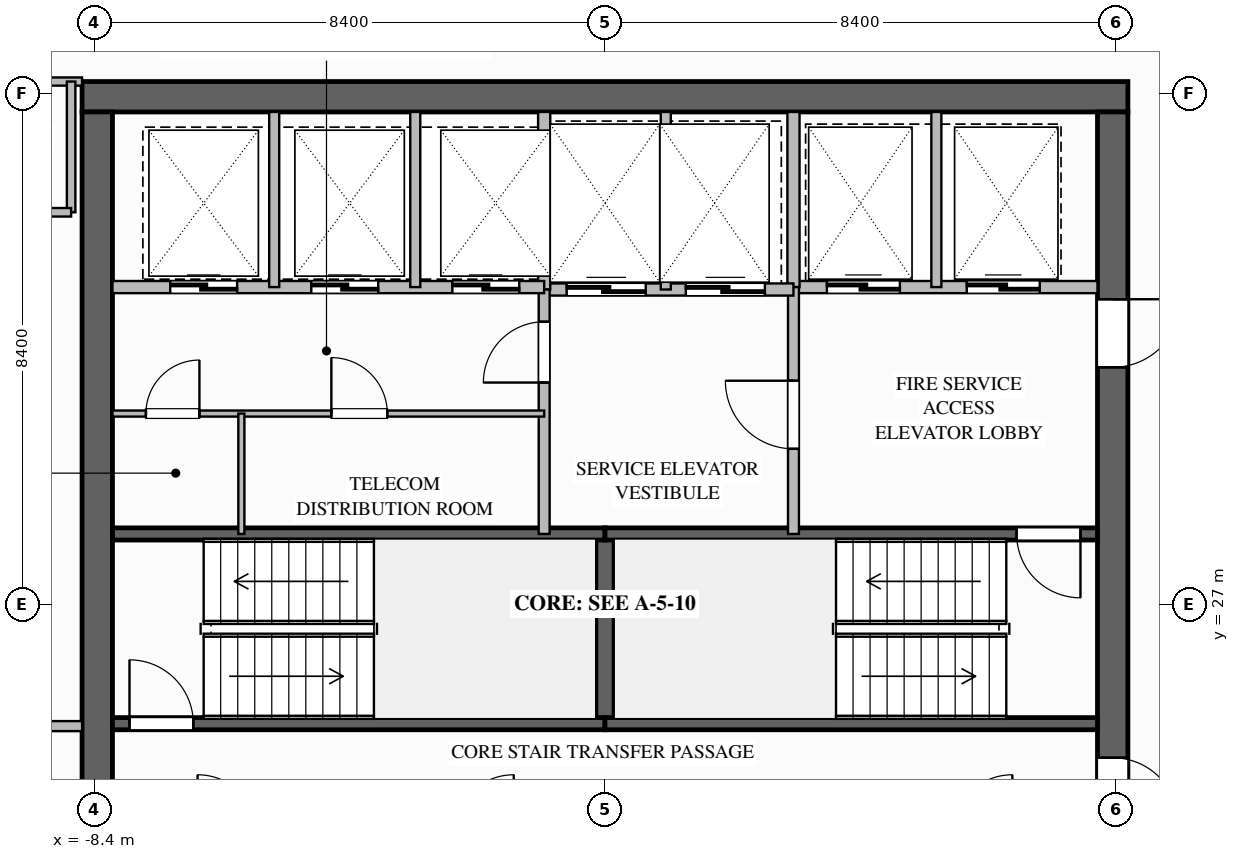
"""IFC4 building model, lengths in metres.
Left out: names, types, materials, properties, quantities, classifications, styles, units other than length and angle.
Written with IfcOpenShell. Run it as: python <this file> out.ifc"""

import sys

from ifc_helpers import new_model, si_unit, direction, frame, frame_2d, origin, place, context, subcontext, project, spatial, rectangle, extrude, element, fill, save


model = new_model("IFC4")
c1 = context("Model", 3, precision=1e-05, world=origin(), true_north=direction((0.0, 1.0)))
c2 = subcontext(c1, "Body", "Model", "MODEL_VIEW")
j1 = project(units=[si_unit("LENGTHUNIT", "METRE"), si_unit("PLANEANGLEUNIT", "RADIAN")], contexts=[c1])
p1 = place(None, origin())
s1 = spatial("IfcSite", under=j1, at=p1, CompositionType="ELEMENT")
p2 = place(p1, origin())
s2 = spatial("IfcBuilding", under=s1, at=p2, CompositionType="ELEMENT")
p3 = place(p2, frame((0.0, 0.0, 215.9)))
s3 = spatial("IfcBuildingStorey", under=s2, at=p3, CompositionType="ELEMENT", Elevation=215.9)
p4 = place(p3, frame((-8.6, 35.35, 0.0), z_axis=(0.0, 0.0, 1.0), x_axis=(1.0, 0.0, 0.0)))
e1 = element("IfcWall", 1, at=p4, inside=s3, PredefinedType="SHEAR", context=c2, shape_type="SweptSolid", body=[
    extrude(rectangle(XDim=17.2, YDim=0.5, at=frame_2d((8.6, 0.0))), origin(), (0.0, 0.0, 1.0), 3.6),
])
p5 = place(p3, frame((8.35, 35.1, 0.0), z_axis=(0.0, 0.0, 1.0), x_axis=(0.0, -1.0, 0.0)))
e2 = element("IfcWall", 2, at=p5, inside=s3, PredefinedType="SHEAR", context=c2, shape_type="SweptSolid", body=[
    extrude(rectangle(XDim=16.2, YDim=0.5, at=frame_2d((8.1, 0.0))), origin(), (0.0, 0.0, 1.0), 3.6),
])
p6 = place(p5, frame((3.08, 0.0, 0.0)))
e3 = element("IfcOpeningElement", 3, at=p6, cuts=e2, PredefinedType="OPENING", context=c2, shape_type="SweptSolid", body=[
    extrude(rectangle(XDim=1.12, YDim=2.1, at=frame_2d((0.56, 1.05))), frame((0.0, 0.26, 0.0), z_axis=(0.0, -1.0, 0.0), x_axis=(1.0, 0.0, 0.0)), (0.0, 0.0, 1.0), 0.52),
])
p7 = place(p5, frame((10.62, 0.0, 0.0)))
e4 = element("IfcOpeningElement", 4, at=p7, cuts=e2, PredefinedType="OPENING", context=c2, shape_type="SweptSolid", body=[
    extrude(rectangle(XDim=1.08, YDim=2.04, at=frame_2d((0.54, 1.02))), frame((0.0, 0.26, 0.0), z_axis=(0.0, -1.0, 0.0), x_axis=(1.0, 0.0, 0.0)), (0.0, 0.0, 1.0), 0.52),
])
p8 = place(p3, frame((-8.35, 18.9, 0.0), z_axis=(0.0, 0.0, 1.0), x_axis=(0.0, 1.0, 0.0)))
e5 = element("IfcWall", 5, at=p8, inside=s3, PredefinedType="SHEAR", context=c2, shape_type="SweptSolid", body=[
    extrude(rectangle(XDim=16.2, YDim=0.5, at=frame_2d((8.1, 0.0))), origin(), (0.0, 0.0, 1.0), 3.6),
])
p9 = place(p3, frame((0.0, 25.04, 0.0), z_axis=(0.0, 0.0, 1.0), x_axis=(0.0, 1.0, 0.0)))
e6 = element("IfcWall", 6, at=p9, inside=s3, PredefinedType="SOLIDWALL", context=c2, shape_type="SweptSolid", body=[
    extrude(rectangle(XDim=3.12, YDim=0.3, at=frame_2d((1.56, 0.0))), origin(), (0.0, 0.0, 1.0), 3.34),
])
p10 = place(p3, frame((-8.1, 25.04, 0.0), z_axis=(0.0, 0.0, 1.0), x_axis=(1.0, 0.0, 0.0)))
e7 = element("IfcWall", 7, at=p10, inside=s3, PredefinedType="SOLIDWALL", context=c2, shape_type="SweptSolid", body=[
    extrude(rectangle(XDim=8.1, YDim=0.2, at=frame_2d((4.05, 0.0))), origin(), (0.0, 0.0, 1.0), 3.34),
])
p11 = place(p10, frame((0.28, 0.0, 0.0)))
e8 = element("IfcOpeningElement", 8, at=p11, cuts=e7, PredefinedType="OPENING", context=c2, shape_type="SweptSolid", body=[
    extrude(rectangle(XDim=1.05, YDim=2.1, at=frame_2d((0.525, 1.05))), frame((0.0, 0.11, 0.0), z_axis=(0.0, -1.0, 0.0), x_axis=(1.0, 0.0, 0.0)), (0.0, 0.0, 1.0), 0.22),
])
for number, where, z_axis, x_axis in (
    (9, (-8.1, 28.16, 0.0), (0.0, 0.0, 1.0), (1.0, 0.0, 0.0)),
    (10, (0.0, 25.04, 0.0), (0.0, 0.0, 1.0), (1.0, 0.0, 0.0)),
):
    element("IfcWall", number, at=place(p3, frame(where, z_axis=z_axis, x_axis=x_axis)), inside=s3, PredefinedType="SOLIDWALL", context=c2, shape_type="SweptSolid", body=[
        extrude(rectangle(XDim=8.1, YDim=0.2, at=frame_2d((4.05, 0.0))), origin(), (0.0, 0.0, 1.0), 3.34),
    ])
p12 = place(p3, frame((8.1, 28.16, 0.0), z_axis=(0.0, 0.0, 1.0), x_axis=(-1.0, 0.0, 0.0)))
e11 = element("IfcWall", 11, at=p12, inside=s3, PredefinedType="SOLIDWALL", context=c2, shape_type="SweptSolid", body=[
    extrude(rectangle(XDim=8.1, YDim=0.2, at=frame_2d((4.05, 0.0))), origin(), (0.0, 0.0, 1.0), 3.34),
])
p13 = place(p12, frame((0.28, 0.0, 0.0)))
e12 = element("IfcOpeningElement", 12, at=p13, cuts=e11, PredefinedType="OPENING", context=c2, shape_type="SweptSolid", body=[
    extrude(rectangle(XDim=1.05, YDim=2.1, at=frame_2d((0.525, 1.05))), frame((0.0, 0.11, 0.0), z_axis=(0.0, -1.0, 0.0), x_axis=(1.0, 0.0, 0.0)), (0.0, 0.0, 1.0), 0.22),
])
p14 = place(p3, frame((3.1, 32.22, 0.0), z_axis=(0.0, 0.0, 1.0), x_axis=(1.0, 0.0, 0.0)))
e13 = element("IfcWall", 13, at=p14, inside=s3, PredefinedType="SOLIDWALL", context=c2, shape_type="SweptSolid", body=[
    extrude(rectangle(XDim=5.0, YDim=0.2, at=frame_2d((2.5, 0.0))), origin(), (0.0, 0.0, 1.0), 3.34),
])
p15 = place(p14, frame((0.55, 0.0, 0.0)))
e14 = element("IfcOpeningElement", 14, at=p15, cuts=e13, PredefinedType="OPENING", context=c2, shape_type="SweptSolid", body=[
    extrude(rectangle(XDim=1.2, YDim=2.2, at=frame_2d((0.6, 1.1))), frame((0.0, 0.11, 0.0), z_axis=(0.0, -1.0, 0.0), x_axis=(1.0, 0.0, 0.0)), (0.0, 0.0, 1.0), 0.22),
])
p16 = place(p14, frame((2.85, 0.0, 0.0)))
e15 = element("IfcOpeningElement", 15, at=p16, cuts=e13, PredefinedType="OPENING", context=c2, shape_type="SweptSolid", body=[
    extrude(rectangle(XDim=1.2, YDim=2.2, at=frame_2d((0.6, 1.1))), frame((0.0, 0.11, 0.0), z_axis=(0.0, -1.0, 0.0), x_axis=(1.0, 0.0, 0.0)), (0.0, 0.0, 1.0), 0.22),
])
p17 = place(p3, frame((3.1, 32.22, 0.0), z_axis=(0.0, 0.0, 1.0), x_axis=(0.0, 1.0, 0.0)))
e16 = element("IfcWall", 16, at=p17, inside=s3, PredefinedType="SOLIDWALL", context=c2, shape_type="SweptSolid", body=[
    extrude(rectangle(XDim=2.88, YDim=0.2, at=frame_2d((1.44, 0.0))), origin(), (0.0, 0.0, 1.0), 3.34),
])
p18 = place(p3, frame((5.45, 32.22, 0.0), z_axis=(0.0, 0.0, 1.0), x_axis=(0.0, 1.0, 0.0)))
e17 = element("IfcWall", 17, at=p18, inside=s3, PredefinedType="PARTITIONING", context=c2, shape_type="SweptSolid", body=[
    extrude(rectangle(XDim=2.88, YDim=0.165, at=frame_2d((1.44, 0.0))), origin(), (0.0, 0.0, 1.0), 3.34),
])
p19 = place(p3, frame((3.1, 28.16, 0.0), z_axis=(0.0, 0.0, 1.0), x_axis=(0.0, 1.0, 0.0)))
e18 = element("IfcWall", 18, at=p19, inside=s3, PredefinedType="SOLIDWALL", context=c2, shape_type="SweptSolid", body=[
    extrude(rectangle(XDim=4.06, YDim=0.18, at=frame_2d((2.03, 0.0))), origin(), (0.0, 0.0, 1.0), 3.34),
])
p20 = place(p19, frame((1.4, 0.0, 0.0)))
e19 = element("IfcOpeningElement", 19, at=p20, cuts=e18, PredefinedType="OPENING", context=c2, shape_type="SweptSolid", body=[
    extrude(rectangle(XDim=1.12, YDim=2.1, at=frame_2d((0.56, 1.05))), frame((0.0, 0.1, 0.0), z_axis=(0.0, -1.0, 0.0), x_axis=(1.0, 0.0, 0.0)), (0.0, 0.0, 1.0), 0.2),
])
p21 = place(p3, frame((-1.0, 32.18, 0.0), z_axis=(0.0, 0.0, 1.0), x_axis=(1.0, 0.0, 0.0)))
e20 = element("IfcWall", 20, at=p21, inside=s3, PredefinedType="SOLIDWALL", context=c2, shape_type="SweptSolid", body=[
    extrude(rectangle(XDim=4.1, YDim=0.2, at=frame_2d((2.05, 0.0))), origin(), (0.0, 0.0, 1.0), 3.34),
])
p22 = place(p21, frame((0.37, 0.0, 0.0)))
e21 = element("IfcOpeningElement", 21, at=p22, cuts=e20, PredefinedType="OPENING", context=c2, shape_type="SweptSolid", body=[
    extrude(rectangle(XDim=1.3, YDim=2.2, at=frame_2d((0.65, 1.1))), frame((0.0, 0.11, 0.0), z_axis=(0.0, -1.0, 0.0), x_axis=(1.0, 0.0, 0.0)), (0.0, 0.0, 1.0), 0.22),
])
p23 = place(p21, frame((2.33, 0.0, 0.0)))
e22 = element("IfcOpeningElement", 22, at=p23, cuts=e20, PredefinedType="OPENING", context=c2, shape_type="SweptSolid", body=[
    extrude(rectangle(XDim=1.3, YDim=2.2, at=frame_2d((0.65, 1.1))), frame((0.0, 0.11, 0.0), z_axis=(0.0, -1.0, 0.0), x_axis=(1.0, 0.0, 0.0)), (0.0, 0.0, 1.0), 0.22),
])
p24 = place(p3, frame((-1.0, 32.18, 0.0), z_axis=(0.0, 0.0, 1.0), x_axis=(0.0, 1.0, 0.0)))
e23 = element("IfcWall", 23, at=p24, inside=s3, PredefinedType="SOLIDWALL", context=c2, shape_type="SweptSolid", body=[
    extrude(rectangle(XDim=2.92, YDim=0.2, at=frame_2d((1.46, 0.0))), origin(), (0.0, 0.0, 1.0), 3.34),
])
p25 = place(p3, frame((1.0, 32.18, 0.0), z_axis=(0.0, 0.0, 1.0), x_axis=(0.0, 1.0, 0.0)))
e24 = element("IfcWall", 24, at=p25, inside=s3, PredefinedType="PARTITIONING", context=c2, shape_type="SweptSolid", body=[
    extrude(rectangle(XDim=2.92, YDim=0.165, at=frame_2d((1.46, 0.0))), origin(), (0.0, 0.0, 1.0), 3.34),
])
p26 = place(p3, frame((-1.0, 28.16, 0.0), z_axis=(0.0, 0.0, 1.0), x_axis=(0.0, 1.0, 0.0)))
e25 = element("IfcWall", 25, at=p26, inside=s3, PredefinedType="SOLIDWALL", context=c2, shape_type="SweptSolid", body=[
    extrude(rectangle(XDim=4.02, YDim=0.18, at=frame_2d((2.01, 0.0))), origin(), (0.0, 0.0, 1.0), 3.34),
])
p27 = place(p26, frame((2.49, 0.0, 0.0)))
e26 = element("IfcOpeningElement", 26, at=p27, cuts=e25, PredefinedType="OPENING", context=c2, shape_type="SweptSolid", body=[
    extrude(rectangle(XDim=1.0, YDim=2.1, at=frame_2d((0.5, 1.05))), frame((0.0, 0.1, 0.0), z_axis=(0.0, -1.0, 0.0), x_axis=(1.0, 0.0, 0.0)), (0.0, 0.0, 1.0), 0.2),
])
p28 = place(p3, frame((-8.1, 32.22, 0.0), z_axis=(0.0, 0.0, 1.0), x_axis=(1.0, 0.0, 0.0)))
e27 = element("IfcWall", 27, at=p28, inside=s3, PredefinedType="SOLIDWALL", context=c2, shape_type="SweptSolid", body=[
    extrude(rectangle(XDim=7.1, YDim=0.2, at=frame_2d((3.55, 0.0))), origin(), (0.0, 0.0, 1.0), 3.34),
])
p29 = place(p28, frame((0.95, 0.0, 0.0)))
e28 = element("IfcOpeningElement", 28, at=p29, cuts=e27, PredefinedType="OPENING", context=c2, shape_type="SweptSolid", body=[
    extrude(rectangle(XDim=1.1, YDim=2.2, at=frame_2d((0.55, 1.1))), frame((0.0, 0.11, 0.0), z_axis=(0.0, -1.0, 0.0), x_axis=(1.0, 0.0, 0.0)), (0.0, 0.0, 1.0), 0.22),
])
p30 = place(p28, frame((3.27, 0.0, 0.0)))
e29 = element("IfcOpeningElement", 29, at=p30, cuts=e27, PredefinedType="OPENING", context=c2, shape_type="SweptSolid", body=[
    extrude(rectangle(XDim=1.1, YDim=2.2, at=frame_2d((0.55, 1.1))), frame((0.0, 0.11, 0.0), z_axis=(0.0, -1.0, 0.0), x_axis=(1.0, 0.0, 0.0)), (0.0, 0.0, 1.0), 0.22),
])
p31 = place(p28, frame((5.59, 0.0, 0.0)))
e30 = element("IfcOpeningElement", 30, at=p31, cuts=e27, PredefinedType="OPENING", context=c2, shape_type="SweptSolid", body=[
    extrude(rectangle(XDim=1.1, YDim=2.2, at=frame_2d((0.55, 1.1))), frame((0.0, 0.11, 0.0), z_axis=(0.0, -1.0, 0.0), x_axis=(1.0, 0.0, 0.0)), (0.0, 0.0, 1.0), 0.22),
])
for number, where, z_axis, x_axis in (
    (31, (-5.44, 32.22, 0.0), (0.0, 0.0, 1.0), (0.0, 1.0, 0.0)),
    (32, (-3.12, 32.22, 0.0), (0.0, 0.0, 1.0), (0.0, 1.0, 0.0)),
):
    element("IfcWall", number, at=place(p3, frame(where, z_axis=z_axis, x_axis=x_axis)), inside=s3, PredefinedType="PARTITIONING", context=c2, shape_type="SweptSolid", body=[
        extrude(rectangle(XDim=2.88, YDim=0.165, at=frame_2d((1.44, 0.0))), origin(), (0.0, 0.0, 1.0), 3.34),
    ])
p32 = place(p3, frame((-8.1, 30.14, 0.0), z_axis=(0.0, 0.0, 1.0), x_axis=(1.0, 0.0, 0.0)))
e33 = element("IfcWall", 33, at=p32, inside=s3, PredefinedType="PARTITIONING", context=c2, shape_type="SweptSolid", body=[
    extrude(rectangle(XDim=7.1, YDim=0.1, at=frame_2d((3.55, 0.0))), origin(), (0.0, 0.0, 1.0), 3.34),
])
p33 = place(p32, frame((0.55, 0.0, 0.0)))
e34 = element("IfcOpeningElement", 34, at=p33, cuts=e33, PredefinedType="OPENING", context=c2, shape_type="SweptSolid", body=[
    extrude(rectangle(XDim=0.88, YDim=2.1, at=frame_2d((0.44, 1.05))), frame((0.0, 0.06, 0.0), z_axis=(0.0, -1.0, 0.0), x_axis=(1.0, 0.0, 0.0)), (0.0, 0.0, 1.0), 0.12),
])
p34 = place(p32, frame((3.6, 0.0, 0.0)))
e35 = element("IfcOpeningElement", 35, at=p34, cuts=e33, PredefinedType="OPENING", context=c2, shape_type="SweptSolid", body=[
    extrude(rectangle(XDim=0.92, YDim=2.1, at=frame_2d((0.46, 1.05))), frame((0.0, 0.06, 0.0), z_axis=(0.0, -1.0, 0.0), x_axis=(1.0, 0.0, 0.0)), (0.0, 0.0, 1.0), 0.12),
])
p35 = place(p3, frame((-5.98, 28.16, 0.0), z_axis=(0.0, 0.0, 1.0), x_axis=(0.0, 1.0, 0.0)))
e36 = element("IfcWall", 36, at=p35, inside=s3, PredefinedType="PARTITIONING", context=c2, shape_type="SweptSolid", body=[
    extrude(rectangle(XDim=1.98, YDim=0.1, at=frame_2d((0.99, 0.0))), origin(), (0.0, 0.0, 1.0), 3.34),
])
p36 = place(p3, frame((-16.2, 35.6, 0.0), z_axis=(0.0, 0.0, 1.0), x_axis=(1.0, 0.0, 0.0)))
e37 = element("IfcWall", 37, at=p36, inside=s3, PredefinedType="PARTITIONING", context=c2, shape_type="SweptSolid", body=[
    extrude(rectangle(XDim=7.6, YDim=0.135, at=frame_2d((3.8, 0.0))), origin(), (0.0, 0.0, 1.0), 2.718),
])
p37 = place(p36, frame((2.155, 0.0, 0.0)))
e38 = element("IfcOpeningElement", 38, at=p37, cuts=e37, PredefinedType="OPENING", context=c2, shape_type="SweptSolid", body=[
    extrude(rectangle(XDim=1.26, YDim=2.2, at=frame_2d((0.63, 1.1))), frame((0.0, 0.077, 0.0), z_axis=(0.0, -1.0, 0.0), x_axis=(1.0, 0.0, 0.0)), (0.0, 0.0, 1.0), 0.155),
])
p38 = place(p3, frame((-21.4, 25.0, 0.0), z_axis=(0.0, 0.0, 1.0), x_axis=(1.0, 0.0, 0.0)))
e39 = element("IfcWall", 39, at=p38, inside=s3, PredefinedType="PARTITIONING", context=c2, shape_type="SweptSolid", body=[
    extrude(rectangle(XDim=12.8, YDim=0.165, at=frame_2d((6.4, 0.0))), origin(), (0.0, 0.0, 1.0), 3.34),
])
p39 = place(p3, frame((-8.78, 35.6, 0.0), z_axis=(0.0, 0.0, 1.0), x_axis=(0.0, -1.0, 0.0)))
e40 = element("IfcWall", 40, at=p39, inside=s3, PredefinedType="PLUMBINGWALL", context=c2, shape_type="SweptSolid", body=[
    extrude(rectangle(XDim=2.15, YDim=0.14, at=frame_2d((1.075, 0.0))), origin(), (0.0, 0.0, 1.0), 3.34),
])
p40 = place(p3, frame((-11.03, 33.45, 0.0), z_axis=(0.0, 0.0, 1.0), x_axis=(1.0, 0.0, 0.0)))
e41 = element("IfcWall", 41, at=p40, inside=s3, PredefinedType="PLUMBINGWALL", context=c2, shape_type="SweptSolid", body=[
    extrude(rectangle(XDim=2.25, YDim=0.14, at=frame_2d((1.125, 0.0))), origin(), (0.0, 0.0, 1.0), 3.34),
])
p41 = place(p40, frame((0.685, 0.0, 0.0)))
e42 = element("IfcOpeningElement", 42, at=p41, cuts=e41, PredefinedType="OPENING", context=c2, shape_type="SweptSolid", body=[
    extrude(rectangle(XDim=0.88, YDim=2.1, at=frame_2d((0.44, 1.05))), frame((0.0, 0.08, 0.0), z_axis=(0.0, -1.0, 0.0), x_axis=(1.0, 0.0, 0.0)), (0.0, 0.0, 1.0), 0.16),
])
p42 = place(p11, origin())
e43 = element("IfcDoor", 43, at=p42, inside=s3, OperationType="SINGLE_SWING_LEFT", PredefinedType="DOOR", context=c2, shape_type="SweptSolid", body=[
    extrude(rectangle(XDim=1.05, YDim=2.1, at=frame_2d((0.525, 1.05))), frame((0.0, 0.025, 0.0), z_axis=(0.0, -1.0, 0.0), x_axis=(1.0, 0.0, 0.0)), (0.0, 0.0, 1.0), 0.05),
])
fill(e8, e43)
p43 = place(p13, origin())
e44 = element("IfcDoor", 44, at=p43, inside=s3, OperationType="SINGLE_SWING_LEFT", PredefinedType="DOOR", context=c2, shape_type="SweptSolid", body=[
    extrude(rectangle(XDim=1.05, YDim=2.1, at=frame_2d((0.525, 1.05))), frame((0.0, 0.025, 0.0), z_axis=(0.0, -1.0, 0.0), x_axis=(1.0, 0.0, 0.0)), (0.0, 0.0, 1.0), 0.05),
])
fill(e12, e44)
p44 = place(p15, origin())
e45 = element("IfcDoor", 45, at=p44, inside=s3, OperationType="SLIDING_TO_LEFT", PredefinedType="DOOR", context=c2, shape_type="SweptSolid", body=[
    extrude(rectangle(XDim=1.2, YDim=2.2, at=frame_2d((0.6, 1.1))), frame((0.0, 0.025, 0.0), z_axis=(0.0, -1.0, 0.0), x_axis=(1.0, 0.0, 0.0)), (0.0, 0.0, 1.0), 0.05),
])
fill(e14, e45)
p45 = place(p16, origin())
e46 = element("IfcDoor", 46, at=p45, inside=s3, OperationType="SLIDING_TO_LEFT", PredefinedType="DOOR", context=c2, shape_type="SweptSolid", body=[
    extrude(rectangle(XDim=1.2, YDim=2.2, at=frame_2d((0.6, 1.1))), frame((0.0, 0.025, 0.0), z_axis=(0.0, -1.0, 0.0), x_axis=(1.0, 0.0, 0.0)), (0.0, 0.0, 1.0), 0.05),
])
fill(e15, e46)
p46 = place(p20, origin())
e47 = element("IfcDoor", 47, at=p46, inside=s3, OperationType="SINGLE_SWING_RIGHT", PredefinedType="DOOR", context=c2, shape_type="SweptSolid", body=[
    extrude(rectangle(XDim=1.12, YDim=2.1, at=frame_2d((0.56, 1.05))), frame((0.0, 0.025, 0.0), z_axis=(0.0, -1.0, 0.0), x_axis=(1.0, 0.0, 0.0)), (0.0, 0.0, 1.0), 0.05),
])
fill(e19, e47)
p47 = place(p6, origin())
e48 = element("IfcDoor", 48, at=p47, inside=s3, OperationType="SINGLE_SWING_LEFT", PredefinedType="DOOR", context=c2, shape_type="SweptSolid", body=[
    extrude(rectangle(XDim=1.12, YDim=2.1, at=frame_2d((0.56, 1.05))), frame((0.0, 0.025, 0.0), z_axis=(0.0, -1.0, 0.0), x_axis=(1.0, 0.0, 0.0)), (0.0, 0.0, 1.0), 0.05),
])
fill(e3, e48)
p48 = place(p22, origin())
e49 = element("IfcDoor", 49, at=p48, inside=s3, OperationType="SLIDING_TO_LEFT", PredefinedType="DOOR", context=c2, shape_type="SweptSolid", body=[
    extrude(rectangle(XDim=1.3, YDim=2.2, at=frame_2d((0.65, 1.1))), frame((0.0, 0.025, 0.0), z_axis=(0.0, -1.0, 0.0), x_axis=(1.0, 0.0, 0.0)), (0.0, 0.0, 1.0), 0.05),
])
fill(e21, e49)
p49 = place(p23, origin())
e50 = element("IfcDoor", 50, at=p49, inside=s3, OperationType="SLIDING_TO_LEFT", PredefinedType="DOOR", context=c2, shape_type="SweptSolid", body=[
    extrude(rectangle(XDim=1.3, YDim=2.2, at=frame_2d((0.65, 1.1))), frame((0.0, 0.025, 0.0), z_axis=(0.0, -1.0, 0.0), x_axis=(1.0, 0.0, 0.0)), (0.0, 0.0, 1.0), 0.05),
])
fill(e22, e50)
p50 = place(p27, origin())
e51 = element("IfcDoor", 51, at=p50, inside=s3, OperationType="SINGLE_SWING_LEFT", PredefinedType="DOOR", context=c2, shape_type="SweptSolid", body=[
    extrude(rectangle(XDim=1.0, YDim=2.1, at=frame_2d((0.5, 1.05))), frame((0.0, 0.025, 0.0), z_axis=(0.0, -1.0, 0.0), x_axis=(1.0, 0.0, 0.0)), (0.0, 0.0, 1.0), 0.05),
])
fill(e26, e51)
p51 = place(p29, origin())
e52 = element("IfcDoor", 52, at=p51, inside=s3, OperationType="SLIDING_TO_LEFT", PredefinedType="DOOR", context=c2, shape_type="SweptSolid", body=[
    extrude(rectangle(XDim=1.1, YDim=2.2, at=frame_2d((0.55, 1.1))), frame((0.0, 0.025, 0.0), z_axis=(0.0, -1.0, 0.0), x_axis=(1.0, 0.0, 0.0)), (0.0, 0.0, 1.0), 0.05),
])
fill(e28, e52)
p52 = place(p30, origin())
e53 = element("IfcDoor", 53, at=p52, inside=s3, OperationType="SLIDING_TO_LEFT", PredefinedType="DOOR", context=c2, shape_type="SweptSolid", body=[
    extrude(rectangle(XDim=1.1, YDim=2.2, at=frame_2d((0.55, 1.1))), frame((0.0, 0.025, 0.0), z_axis=(0.0, -1.0, 0.0), x_axis=(1.0, 0.0, 0.0)), (0.0, 0.0, 1.0), 0.05),
])
fill(e29, e53)
p53 = place(p31, origin())
e54 = element("IfcDoor", 54, at=p53, inside=s3, OperationType="SLIDING_TO_LEFT", PredefinedType="DOOR", context=c2, shape_type="SweptSolid", body=[
    extrude(rectangle(XDim=1.1, YDim=2.2, at=frame_2d((0.55, 1.1))), frame((0.0, 0.025, 0.0), z_axis=(0.0, -1.0, 0.0), x_axis=(1.0, 0.0, 0.0)), (0.0, 0.0, 1.0), 0.05),
])
fill(e30, e54)
p54 = place(p33, origin())
e55 = element("IfcDoor", 55, at=p54, inside=s3, OperationType="SINGLE_SWING_RIGHT", PredefinedType="DOOR", context=c2, shape_type="SweptSolid", body=[
    extrude(rectangle(XDim=0.88, YDim=2.1, at=frame_2d((0.44, 1.05))), frame((0.0, 0.025, 0.0), z_axis=(0.0, -1.0, 0.0), x_axis=(1.0, 0.0, 0.0)), (0.0, 0.0, 1.0), 0.05),
])
fill(e34, e55)
p55 = place(p34, origin())
e56 = element("IfcDoor", 56, at=p55, inside=s3, OperationType="SINGLE_SWING_LEFT", PredefinedType="DOOR", context=c2, shape_type="SweptSolid", body=[
    extrude(rectangle(XDim=0.92, YDim=2.1, at=frame_2d((0.46, 1.05))), frame((0.0, 0.025, 0.0), z_axis=(0.0, -1.0, 0.0), x_axis=(1.0, 0.0, 0.0)), (0.0, 0.0, 1.0), 0.05),
])
fill(e35, e56)
p56 = place(p7, origin())
e57 = element("IfcDoor", 57, at=p56, inside=s3, OperationType="SINGLE_SWING_RIGHT", PredefinedType="DOOR", context=c2, shape_type="SweptSolid", body=[
    extrude(rectangle(XDim=1.08, YDim=2.04, at=frame_2d((0.54, 1.02))), frame((0.0, 0.025, 0.0), z_axis=(0.0, -1.0, 0.0), x_axis=(1.0, 0.0, 0.0)), (0.0, 0.0, 1.0), 0.05),
])
fill(e4, e57)
save(model, sys.argv[1])
